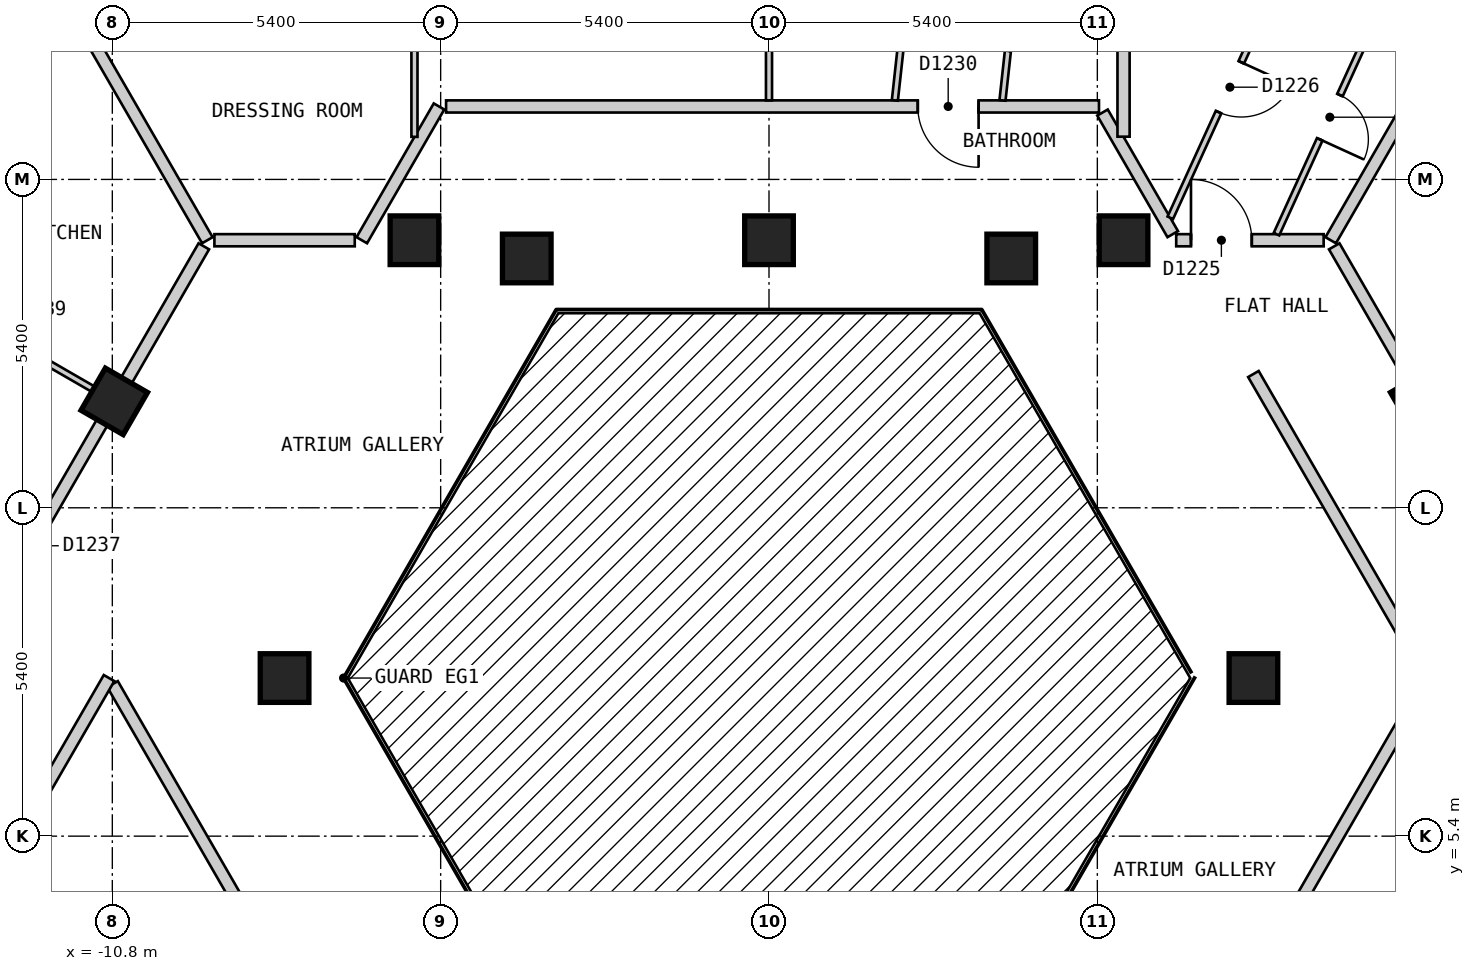
"""IFC4 building model, lengths in metres.
Left out: names, types, materials, properties, quantities, classifications, styles, units other than length and angle.
Written with IfcOpenShell. Run it as: python <this file> out.ifc"""

import sys

from ifc_helpers import new_model, si_unit, direction, frame, frame_2d, origin, origin_2d, place, context, subcontext, project, spatial, rectangle, extrude, element, fill, save


model = new_model("IFC4")
c1 = context("Model", 3, precision=1e-05, world=origin(), true_north=direction((0.0, 1.0)))
c2 = subcontext(c1, "Body", "Model", "MODEL_VIEW")
j1 = project(units=[si_unit("LENGTHUNIT", "METRE"), si_unit("PLANEANGLEUNIT", "RADIAN")], contexts=[c1])
p1 = place(None, origin())
s1 = spatial("IfcSite", under=j1, at=p1, CompositionType="ELEMENT")
p2 = place(p1, origin())
s2 = spatial("IfcBuilding", under=s1, at=p2, CompositionType="ELEMENT")
p3 = place(p2, frame((0.0, 0.0, 129.6)))
s3 = spatial("IfcBuildingStorey", under=s2, at=p3, CompositionType="ELEMENT", Elevation=129.6)
for number, where, z_axis, x_axis in (
    (1, (7.967, 8.0, 0.0), (0.0, 0.0, 1.0), (1.0, 0.0, 0.0)),
    (2, (10.768, 12.55, 0.0), (0.0, 0.0, 1.0), (-0.5, 0.866, 0.0)),
    (3, (5.831, 15.2, 0.0), (0.0, 0.0, 1.0), (-1.0, 0.0, 0.0)),
    (4, (3.984, 14.9, 0.0), (0.0, 0.0, 1.0), (1.0, 0.0, 0.0)),
    (5, (0.0, 15.2, 0.0), (0.0, 0.0, 1.0), (-1.0, 0.0, 0.0)),
    (6, (-3.984, 14.9, 0.0), (0.0, 0.0, 1.0), (1.0, 0.0, 0.0)),
    (7, (-5.831, 15.2, 0.0), (0.0, 0.0, 1.0), (-1.0, 0.0, 0.0)),
    (8, (-10.768, 12.55, 0.0), (0.0, 0.0, 1.0), (-0.5, -0.866, 0.0)),
    (9, (-7.967, 8.0, 0.0), (0.0, 0.0, 1.0), (1.0, 0.0, 0.0)),
):
    element("IfcColumn", number, at=place(p3, frame(where, z_axis=z_axis, x_axis=x_axis)), inside=s3, PredefinedType="COLUMN", context=c2, shape_type="SweptSolid", body=[
        extrude(rectangle(XDim=0.8, YDim=0.8, at=origin_2d()), origin(), (0.0, 0.0, 1.0), 3.0),
    ])
p4 = place(p3, frame((-10.796, 7.9, 0.0), z_axis=(0.0, 0.0, 1.0), x_axis=(0.499954271211, -0.866051803703, 0.0)))
e10 = element("IfcWall", 10, at=p4, inside=s3, PredefinedType="PARTITIONING", context=c2, shape_type="SweptSolid", body=[
    extrude(rectangle(XDim=7.536, YDim=0.2, at=frame_2d((3.768, 0.0))), origin(), (0.0, 0.0, 1.0), 2.7),
])
p5 = place(p3, frame((5.485, 17.3, 0.0), z_axis=(0.0, 0.0, 1.0), x_axis=(0.500027479704, -0.866009537788, 0.0)))
e11 = element("IfcWall", 11, at=p5, inside=s3, PredefinedType="PARTITIONING", context=c2, shape_type="SweptSolid", body=[
    extrude(rectangle(XDim=2.309, YDim=0.2, at=frame_2d((1.155, 0.0))), origin(), (0.0, 0.0, 1.0), 2.7),
])
p6 = place(p3, frame((7.967, 13.0, 0.0), z_axis=(0.0, 0.0, 1.0), x_axis=(0.50003774998, -0.866003607726, 0.0)))
e12 = element("IfcWall", 12, at=p6, inside=s3, PredefinedType="PARTITIONING", context=c2, shape_type="SweptSolid", body=[
    extrude(rectangle(XDim=14.433, YDim=0.2, at=frame_2d((7.217, 0.0))), origin(), (0.0, 0.0, 1.0), 2.7),
])
p7 = place(p6, frame((6.824, 0.0, 0.0)))
e13 = element("IfcOpeningElement", 13, at=p7, cuts=e12, PredefinedType="OPENING", context=c2, shape_type="SweptSolid", body=[
    extrude(rectangle(XDim=0.9, YDim=2.1, at=frame_2d((0.45, 1.05))), frame((0.0, 0.11, 0.0), z_axis=(0.0, -1.0, 0.0), x_axis=(1.0, 0.0, 0.0)), (0.0, 0.0, 1.0), 0.22),
])
p8 = place(p3, frame((9.296, 15.1, 0.0), z_axis=(0.0, 0.0, 1.0), x_axis=(0.499974024244, -0.866040400375, 0.0)))
e14 = element("IfcWall", 14, at=p8, inside=s3, PredefinedType="PARTITIONING", context=c2, shape_type="SweptSolid", body=[
    extrude(rectangle(XDim=16.857, YDim=0.2, at=frame_2d((8.429, 0.0))), origin(), (0.0, 0.0, 1.0), 2.7),
])
p9 = place(p8, frame((5.187, 0.0, 0.0)))
e15 = element("IfcOpeningElement", 15, at=p9, cuts=e14, PredefinedType="OPENING", context=c2, shape_type="SweptSolid", body=[
    extrude(rectangle(XDim=1.0, YDim=2.1, at=frame_2d((0.5, 1.05))), frame((0.0, 0.11, 0.0), z_axis=(0.0, -1.0, 0.0), x_axis=(1.0, 0.0, 0.0)), (0.0, 0.0, 1.0), 0.22),
])
p10 = place(p3, frame((-9.121, 15.2, 0.0), z_axis=(0.0, 0.0, 1.0), x_axis=(1.0, 0.0, 0.0)))
e16 = element("IfcWall", 16, at=p10, inside=s3, PredefinedType="PARTITIONING", context=c2, shape_type="SweptSolid", body=[
    extrude(rectangle(XDim=2.308, YDim=0.2, at=frame_2d((1.154, 0.0))), origin(), (0.0, 0.0, 1.0), 2.7),
])
p11 = place(p3, frame((6.697, 15.2, 0.0), z_axis=(0.0, 0.0, 1.0), x_axis=(1.0, 0.0, 0.0)))
e17 = element("IfcWall", 17, at=p11, inside=s3, PredefinedType="PARTITIONING", context=c2, shape_type="SweptSolid", body=[
    extrude(rectangle(XDim=2.425, YDim=0.2, at=frame_2d((1.212, 0.0))), origin(), (0.0, 0.0, 1.0), 2.7),
])
p12 = place(p11, frame((0.243, 0.0, 0.0)))
e18 = element("IfcOpeningElement", 18, at=p12, cuts=e17, PredefinedType="OPENING", context=c2, shape_type="SweptSolid", body=[
    extrude(rectangle(XDim=1.0, YDim=2.1, at=frame_2d((0.5, 1.05))), frame((0.0, 0.11, 0.0), z_axis=(0.0, -1.0, 0.0), x_axis=(1.0, 0.0, 0.0)), (0.0, 0.0, 1.0), 0.22),
])
p13 = place(p3, frame((-5.311, 17.4, 0.0), z_axis=(0.0, 0.0, 1.0), x_axis=(1.0, 0.0, 0.0)))
e19 = element("IfcWall", 19, at=p13, inside=s3, PredefinedType="PARTITIONING", context=c2, shape_type="SweptSolid", body=[
    extrude(rectangle(XDim=10.738, YDim=0.2, at=frame_2d((5.369, 0.0))), origin(), (0.0, 0.0, 1.0), 2.7),
])
p14 = place(p13, frame((7.758, 0.0, 0.0)))
e20 = element("IfcOpeningElement", 20, at=p14, cuts=e19, PredefinedType="OPENING", context=c2, shape_type="SweptSolid", body=[
    extrude(rectangle(XDim=1.0, YDim=2.1, at=frame_2d((0.5, 1.05))), frame((0.0, 0.11, 0.0), z_axis=(0.0, -1.0, 0.0), x_axis=(1.0, 0.0, 0.0)), (0.0, 0.0, 1.0), 0.22),
])
p15 = place(p3, frame((7.028, 1.373, 0.0), z_axis=(0.0, 0.0, 1.0), x_axis=(0.499954271211, 0.866051803703, 0.0)))
e21 = element("IfcWall", 21, at=p15, inside=s3, PredefinedType="PARTITIONING", context=c2, shape_type="SweptSolid", body=[
    extrude(rectangle(XDim=7.536, YDim=0.2, at=frame_2d((3.768, 0.0))), origin(), (0.0, 0.0, 1.0), 2.7),
])
p16 = place(p3, frame((-15.242, 0.399, 0.0), z_axis=(0.0, 0.0, 1.0), x_axis=(0.499953615651, 0.866052182145, 0.0)))
e22 = element("IfcWall", 22, at=p16, inside=s3, PredefinedType="PARTITIONING", context=c2, shape_type="SweptSolid", body=[
    extrude(rectangle(XDim=8.777, YDim=0.2, at=frame_2d((4.388, 0.0))), origin(), (0.0, 0.0, 1.0), 2.7),
])
p17 = place(p16, frame((3.938, 0.0, 0.0)))
e23 = element("IfcOpeningElement", 23, at=p17, cuts=e22, PredefinedType="OPENING", context=c2, shape_type="SweptSolid", body=[
    extrude(rectangle(XDim=0.9, YDim=2.1, at=frame_2d((0.45, 1.05))), frame((0.0, 0.11, 0.0), z_axis=(0.0, -1.0, 0.0), x_axis=(1.0, 0.0, 0.0)), (0.0, 0.0, 1.0), 0.22),
])
p18 = place(p3, frame((-6.697, 15.2, 0.0), z_axis=(0.0, 0.0, 1.0), x_axis=(0.499963722229, 0.866046347752, 0.0)))
e24 = element("IfcWall", 24, at=p18, inside=s3, PredefinedType="PARTITIONING", context=c2, shape_type="SweptSolid", body=[
    extrude(rectangle(XDim=2.54, YDim=0.2, at=frame_2d((1.27, 0.0))), origin(), (0.0, 0.0, 1.0), 2.7),
])
p19 = place(p3, frame((-17.753, 0.45, 0.0), z_axis=(0.0, 0.0, 1.0), x_axis=(0.499988552313, 0.866032013009, 0.0)))
e25 = element("IfcWall", 25, at=p19, inside=s3, PredefinedType="PARTITIONING", context=c2, shape_type="SweptSolid", body=[
    extrude(rectangle(XDim=16.917, YDim=0.2, at=frame_2d((8.458, 0.0))), origin(), (0.0, 0.0, 1.0), 2.7),
])
p20 = place(p19, frame((10.73, 0.0, 0.0)))
e26 = element("IfcOpeningElement", 26, at=p20, cuts=e25, PredefinedType="OPENING", context=c2, shape_type="SweptSolid", body=[
    extrude(rectangle(XDim=1.0, YDim=2.1, at=frame_2d((0.5, 1.05))), frame((0.0, 0.11, 0.0), z_axis=(0.0, -1.0, 0.0), x_axis=(1.0, 0.0, 0.0)), (0.0, 0.0, 1.0), 0.22),
])
p21 = place(p19, frame((0.594, 0.0, 0.0)))
e27 = element("IfcOpeningElement", 27, at=p21, cuts=e25, PredefinedType="OPENING", context=c2, shape_type="SweptSolid", body=[
    extrude(rectangle(XDim=1.0, YDim=2.1, at=frame_2d((0.5, 1.05))), frame((0.0, 0.11, 0.0), z_axis=(0.0, -1.0, 0.0), x_axis=(1.0, 0.0, 0.0)), (0.0, 0.0, 1.0), 0.22),
])
p22 = place(p3, frame((0.0, 21.325, 0.0), z_axis=(0.0, 0.0, 1.0), x_axis=(0.0, -1.0, 0.0)))
e28 = element("IfcWall", 28, at=p22, inside=s3, PredefinedType="PARTITIONING", context=c2, shape_type="SweptSolid", body=[
    extrude(rectangle(XDim=3.825, YDim=0.1, at=frame_2d((1.913, 0.0))), origin(), (0.0, 0.0, 1.0), 2.7),
])
p23 = place(p22, frame((1.537, 0.0, 0.0)))
e29 = element("IfcOpeningElement", 29, at=p23, cuts=e28, PredefinedType="OPENING", context=c2, shape_type="SweptSolid", body=[
    extrude(rectangle(XDim=0.8, YDim=2.1, at=frame_2d((0.4, 1.05))), frame((0.0, 0.06, 0.0), z_axis=(0.0, -1.0, 0.0), x_axis=(1.0, 0.0, 0.0)), (0.0, 0.0, 1.0), 0.12),
])
p24 = place(p3, frame((-19.706, 5.16, 0.0), z_axis=(0.0, 0.0, 1.0), x_axis=(0.500003799672, 0.866023210032, 0.0)))
e30 = element("IfcWall", 30, at=p24, inside=s3, PredefinedType="PARTITIONING", context=c2, shape_type="SweptSolid", body=[
    extrude(rectangle(XDim=16.15, YDim=0.1, at=frame_2d((8.075, 0.0))), origin(), (0.0, 0.0, 1.0), 2.7),
])
p25 = place(p24, frame((7.677, 0.0, 0.0)))
e31 = element("IfcOpeningElement", 31, at=p25, cuts=e30, PredefinedType="OPENING", context=c2, shape_type="SweptSolid", body=[
    extrude(rectangle(XDim=0.9, YDim=2.1, at=frame_2d((0.45, 1.05))), frame((0.0, 0.06, 0.0), z_axis=(0.0, -1.0, 0.0), x_axis=(1.0, 0.0, 0.0)), (0.0, 0.0, 1.0), 0.12),
])
p26 = place(p3, frame((8.346, 15.3, 0.0), z_axis=(0.0, 0.0, 1.0), x_axis=(0.415189790387, 0.909734817383, 0.0)))
e32 = element("IfcWall", 32, at=p26, inside=s3, PredefinedType="PARTITIONING", context=c2, shape_type="SweptSolid", body=[
    extrude(rectangle(XDim=4.282, YDim=0.1, at=frame_2d((2.141, 0.0))), origin(), (0.0, 0.0, 1.0), 2.7),
])
p27 = place(p26, frame((1.714, 0.0, 0.0)))
e33 = element("IfcOpeningElement", 33, at=p27, cuts=e32, PredefinedType="OPENING", context=c2, shape_type="SweptSolid", body=[
    extrude(rectangle(XDim=0.8, YDim=2.1, at=frame_2d((0.4, 1.05))), frame((0.0, 0.06, 0.0), z_axis=(0.0, -1.0, 0.0), x_axis=(1.0, 0.0, 0.0)), (0.0, 0.0, 1.0), 0.12),
])
p28 = place(p3, frame((6.6, 15.569, 0.0), z_axis=(0.0, 0.0, 1.0), x_axis=(0.415221636251, 0.909720282718, 0.0)))
e34 = element("IfcWall", 34, at=p28, inside=s3, PredefinedType="PARTITIONING", context=c2, shape_type="SweptSolid", body=[
    extrude(rectangle(XDim=4.783, YDim=0.1, at=frame_2d((2.391, 0.0))), origin(), (0.0, 0.0, 1.0), 2.7),
])
p29 = place(p28, frame((1.911, 0.0, 0.0)))
e35 = element("IfcOpeningElement", 35, at=p29, cuts=e34, PredefinedType="OPENING", context=c2, shape_type="SweptSolid", body=[
    extrude(rectangle(XDim=0.9, YDim=2.1, at=frame_2d((0.45, 1.05))), frame((0.0, 0.06, 0.0), z_axis=(0.0, -1.0, 0.0), x_axis=(1.0, 0.0, 0.0)), (0.0, 0.0, 1.0), 0.12),
])
p30 = place(p3, frame((2.07, 17.5, 0.0), z_axis=(0.0, 0.0, 1.0), x_axis=(0.108970694085, 0.994044962681, 0.0)))
e36 = element("IfcWall", 36, at=p30, inside=s3, PredefinedType="PARTITIONING", context=c2, shape_type="SweptSolid", body=[
    extrude(rectangle(XDim=2.733, YDim=0.1, at=frame_2d((1.367, 0.0))), origin(), (0.0, 0.0, 1.0), 2.7),
])
p31 = place(p30, frame((0.867, 0.0, 0.0)))
e37 = element("IfcOpeningElement", 37, at=p31, cuts=e36, PredefinedType="OPENING", context=c2, shape_type="SweptSolid", body=[
    extrude(rectangle(XDim=0.9, YDim=2.1, at=frame_2d((0.45, 1.05))), frame((0.0, 0.06, 0.0), z_axis=(0.0, -1.0, 0.0), x_axis=(1.0, 0.0, 0.0)), (0.0, 0.0, 1.0), 0.12),
])
p32 = place(p3, frame((3.84, 17.5, 0.0), z_axis=(0.0, 0.0, 1.0), x_axis=(0.109141067014, 0.994026271027, 0.0)))
e38 = element("IfcWall", 38, at=p32, inside=s3, PredefinedType="PARTITIONING", context=c2, shape_type="SweptSolid", body=[
    extrude(rectangle(XDim=2.492, YDim=0.1, at=frame_2d((1.246, 0.0))), origin(), (0.0, 0.0, 1.0), 2.7),
])
p33 = place(p32, frame((0.82, 0.0, 0.0)))
e39 = element("IfcOpeningElement", 39, at=p33, cuts=e38, PredefinedType="OPENING", context=c2, shape_type="SweptSolid", body=[
    extrude(rectangle(XDim=0.8, YDim=2.1, at=frame_2d((0.4, 1.05))), frame((0.0, 0.06, 0.0), z_axis=(0.0, -1.0, 0.0), x_axis=(1.0, 0.0, 0.0)), (0.0, 0.0, 1.0), 0.12),
])
p34 = place(p3, frame((-5.831, 16.9, 0.0), z_axis=(0.0, 0.0, 1.0), x_axis=(0.0, 1.0, 0.0)))
e40 = element("IfcWall", 40, at=p34, inside=s3, PredefinedType="PARTITIONING", context=c2, shape_type="SweptSolid", body=[
    extrude(rectangle(XDim=8.4, YDim=0.1, at=frame_2d((4.2, 0.0))), origin(), (0.0, 0.0, 1.0), 2.7),
])
p35 = place(p34, frame((5.977, 0.0, 0.0)))
e41 = element("IfcOpeningElement", 41, at=p35, cuts=e40, PredefinedType="OPENING", context=c2, shape_type="SweptSolid", body=[
    extrude(rectangle(XDim=0.9, YDim=2.1, at=frame_2d((0.45, 1.05))), frame((0.0, 0.06, 0.0), z_axis=(0.0, -1.0, 0.0), x_axis=(1.0, 0.0, 0.0)), (0.0, 0.0, 1.0), 0.12),
])
p36 = place(p3, frame((-11.52, 19.155, 0.0), z_axis=(0.0, 0.0, 1.0), x_axis=(0.499916824138, -0.866073420066, 0.0)))
e42 = element("IfcWall", 42, at=p36, inside=s3, PredefinedType="PARTITIONING", context=c2, shape_type="SweptSolid", body=[
    extrude(rectangle(XDim=4.567, YDim=0.2, at=frame_2d((2.283, 0.0))), origin(), (0.0, 0.0, 1.0), 2.7),
])
p37 = place(p3, frame((9.238, 15.2, 0.0), z_axis=(0.0, 0.0, 1.0), x_axis=(0.499890453443, 0.866088641281, 0.0)))
e43 = element("IfcWall", 43, at=p37, inside=s3, PredefinedType="PARTITIONING", context=c2, shape_type="SweptSolid", body=[
    extrude(rectangle(XDim=4.487, YDim=0.2, at=frame_2d((2.243, 0.0))), origin(), (0.0, 0.0, 1.0), 2.7),
])
p38 = place(p3, frame((5.831, 16.903, 0.0), z_axis=(0.0, 0.0, 1.0), x_axis=(0.0, 1.0, 0.0)))
e44 = element("IfcWall", 44, at=p38, inside=s3, PredefinedType="PARTITIONING", context=c2, shape_type="SweptSolid", body=[
    extrude(rectangle(XDim=8.397, YDim=0.2, at=frame_2d((4.198, 0.0))), origin(), (0.0, 0.0, 1.0), 2.7),
])
p39 = place(p3, frame((-14.271, 14.573, 0.0), z_axis=(0.0, 0.0, 1.0), x_axis=(0.866014535457, -0.500018824023, 0.0)))
e45 = element("IfcWall", 45, at=p39, inside=s3, PredefinedType="PARTITIONING", context=c2, shape_type="SweptSolid", body=[
    extrude(rectangle(XDim=3.946, YDim=0.1, at=frame_2d((1.973, 0.0))), origin(), (0.0, 0.0, 1.0), 2.7),
])
p40 = place(p39, frame((1.574, 0.0, 0.0)))
e46 = element("IfcOpeningElement", 46, at=p40, cuts=e45, PredefinedType="OPENING", context=c2, shape_type="SweptSolid", body=[
    extrude(rectangle(XDim=0.9, YDim=2.1, at=frame_2d((0.45, 1.05))), frame((0.0, 0.06, 0.0), z_axis=(0.0, -1.0, 0.0), x_axis=(1.0, 0.0, 0.0)), (0.0, 0.0, 1.0), 0.12),
])
p41 = place(p12, origin())
e47 = element("IfcDoor", 47, at=p41, inside=s3, OperationType="SINGLE_SWING_LEFT", PredefinedType="DOOR", context=c2, shape_type="SweptSolid", body=[
    extrude(rectangle(XDim=1.0, YDim=2.1, at=frame_2d((0.5, 1.05))), frame((0.0, 0.025, 0.0), z_axis=(0.0, -1.0, 0.0), x_axis=(1.0, 0.0, 0.0)), (0.0, 0.0, 1.0), 0.05),
])
fill(e18, e47)
p42 = place(p29, origin())
e48 = element("IfcDoor", 48, at=p42, inside=s3, OperationType="SINGLE_SWING_RIGHT", PredefinedType="DOOR", context=c2, shape_type="SweptSolid", body=[
    extrude(rectangle(XDim=0.9, YDim=2.1, at=frame_2d((0.45, 1.05))), frame((0.0, 0.025, 0.0), z_axis=(0.0, -1.0, 0.0), x_axis=(1.0, 0.0, 0.0)), (0.0, 0.0, 1.0), 0.05),
])
fill(e35, e48)
p43 = place(p27, origin())
e49 = element("IfcDoor", 49, at=p43, inside=s3, OperationType="SINGLE_SWING_LEFT", PredefinedType="DOOR", context=c2, shape_type="SweptSolid", body=[
    extrude(rectangle(XDim=0.8, YDim=2.1, at=frame_2d((0.4, 1.05))), frame((0.0, 0.025, 0.0), z_axis=(0.0, -1.0, 0.0), x_axis=(1.0, 0.0, 0.0)), (0.0, 0.0, 1.0), 0.05),
])
fill(e33, e49)
p44 = place(p14, origin())
e50 = element("IfcDoor", 50, at=p44, inside=s3, OperationType="SINGLE_SWING_RIGHT", PredefinedType="DOOR", context=c2, shape_type="SweptSolid", body=[
    extrude(rectangle(XDim=1.0, YDim=2.1, at=frame_2d((0.5, 1.05))), frame((0.0, 0.025, 0.0), z_axis=(0.0, -1.0, 0.0), x_axis=(1.0, 0.0, 0.0)), (0.0, 0.0, 1.0), 0.05),
])
fill(e20, e50)
save(model, sys.argv[1])
